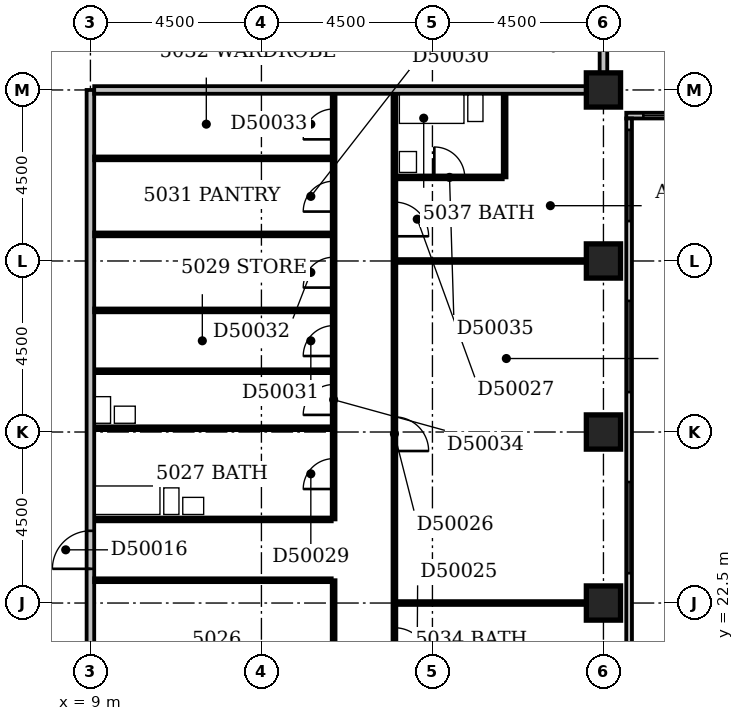
"""IFC4 building model, lengths in metres.
Left out: names, types, materials, properties, quantities, classifications, styles, units other than length and angle.
Written with IfcOpenShell. Run it as: python <this file> out.ifc"""

import sys

from ifc_helpers import new_model, si_unit, direction, frame, frame_2d, origin, origin_2d, place, context, subcontext, project, spatial, rectangle, extrude, element, fill, save


model = new_model("IFC4")
c1 = context("Model", 3, precision=1e-05, world=origin(), true_north=direction((0.0, 1.0)))
c2 = subcontext(c1, "Body", "Model", "MODEL_VIEW")
j1 = project(units=[si_unit("LENGTHUNIT", "METRE"), si_unit("PLANEANGLEUNIT", "RADIAN")], contexts=[c1])
p1 = place(None, origin())
s1 = spatial("IfcSite", under=j1, at=p1, CompositionType="ELEMENT")
p2 = place(p1, origin())
s2 = spatial("IfcBuilding", under=s1, at=p2, CompositionType="ELEMENT")
p3 = place(p2, frame((0.0, 0.0, 197.0)))
s3 = spatial("IfcBuildingStorey", under=s2, at=p3, CompositionType="ELEMENT", Elevation=197.0)
for number, where, z_axis, x_axis in (
    (1, (22.5, 22.5, -0.3), (0.0, 0.0, 1.0), (1.0, 0.0, 0.0)),
    (2, (22.5, 27.0, -0.3), (0.0, 0.0, 1.0), (1.0, 0.0, 0.0)),
    (3, (22.5, 31.5, -0.3), (0.0, 0.0, 1.0), (1.0, 0.0, 0.0)),
    (4, (22.5, 36.0, -0.3), (0.0, 0.0, 1.0), (1.0, 0.0, 0.0)),
):
    element("IfcColumn", number, at=place(p3, frame(where, z_axis=z_axis, x_axis=x_axis)), inside=s3, PredefinedType="COLUMN", context=c2, shape_type="SweptSolid", body=[
        extrude(rectangle(XDim=0.9, YDim=0.9, at=origin_2d()), origin(), (0.0, 0.0, 1.0), 3.6),
    ])
p4 = place(p3, frame((23.175, 17.4, 0.0), z_axis=(0.0, 0.0, 1.0), x_axis=(0.0, 1.0, 0.0)))
e5 = element("IfcWall", 5, at=p4, inside=s3, PredefinedType="STANDARD", context=c2, shape_type="SweptSolid", body=[
    extrude(rectangle(XDim=17.85, YDim=0.15, at=frame_2d((8.925, 0.0))), origin(), (0.0, 0.0, 1.0), 2.7),
])
p5 = place(p4, frame((1.65, 0.0, 0.6)))
e6 = element("IfcOpeningElement", 6, at=p5, cuts=e5, PredefinedType="OPENING", context=c2, shape_type="SweptSolid", body=[
    extrude(rectangle(XDim=2.4, YDim=1.8, at=frame_2d((1.2, 0.9))), frame((0.0, 0.087, 0.0), z_axis=(0.0, -1.0, 0.0), x_axis=(1.0, 0.0, 0.0)), (0.0, 0.0, 1.0), 0.174),
])
p6 = place(p4, frame((5.885, 0.0, 0.6)))
e7 = element("IfcOpeningElement", 7, at=p6, cuts=e5, PredefinedType="OPENING", context=c2, shape_type="SweptSolid", body=[
    extrude(rectangle(XDim=2.4, YDim=1.8, at=frame_2d((1.2, 0.9))), frame((0.0, 0.087, 0.0), z_axis=(0.0, -1.0, 0.0), x_axis=(1.0, 0.0, 0.0)), (0.0, 0.0, 1.0), 0.174),
])
p7 = place(p4, frame((10.65, 0.0, 0.6)))
e8 = element("IfcOpeningElement", 8, at=p7, cuts=e5, PredefinedType="OPENING", context=c2, shape_type="SweptSolid", body=[
    extrude(rectangle(XDim=2.4, YDim=1.8, at=frame_2d((1.2, 0.9))), frame((0.0, 0.087, 0.0), z_axis=(0.0, -1.0, 0.0), x_axis=(1.0, 0.0, 0.0)), (0.0, 0.0, 1.0), 0.174),
])
p8 = place(p4, frame((15.15, 0.0, 0.6)))
e9 = element("IfcOpeningElement", 9, at=p8, cuts=e5, PredefinedType="OPENING", context=c2, shape_type="SweptSolid", body=[
    extrude(rectangle(XDim=2.4, YDim=1.8, at=frame_2d((1.2, 0.9))), frame((0.0, 0.087, 0.0), z_axis=(0.0, -1.0, 0.0), x_axis=(1.0, 0.0, 0.0)), (0.0, 0.0, 1.0), 0.174),
])
p9 = place(p3, frame((23.1, 35.325, 0.0), z_axis=(0.0, 0.0, 1.0), x_axis=(1.0, 0.0, 0.0)))
e10 = element("IfcWall", 10, at=p9, inside=s3, PredefinedType="STANDARD", context=c2, shape_type="SweptSolid", body=[
    extrude(rectangle(XDim=27.15, YDim=0.15, at=frame_2d((13.575, 0.0))), origin(), (0.0, 0.0, 1.0), 2.7),
])
p10 = place(p9, frame((0.45, 0.0, 0.6)))
e11 = element("IfcOpeningElement", 11, at=p10, cuts=e10, PredefinedType="OPENING", context=c2, shape_type="SweptSolid", body=[
    extrude(rectangle(XDim=2.4, YDim=1.8, at=frame_2d((1.2, 0.9))), frame((0.0, 0.087, 0.0), z_axis=(0.0, -1.0, 0.0), x_axis=(1.0, 0.0, 0.0)), (0.0, 0.0, 1.0), 0.174),
])
p11 = place(p9, frame((4.552, 0.0, 0.6)))
e12 = element("IfcOpeningElement", 12, at=p11, cuts=e10, PredefinedType="OPENING", context=c2, shape_type="SweptSolid", body=[
    extrude(rectangle(XDim=1.5, YDim=1.8, at=frame_2d((0.75, 0.9))), frame((0.0, 0.087, 0.0), z_axis=(0.0, -1.0, 0.0), x_axis=(1.0, 0.0, 0.0)), (0.0, 0.0, 1.0), 0.174),
])
p12 = place(p9, frame((9.45, 0.0, 0.6)))
e13 = element("IfcOpeningElement", 13, at=p12, cuts=e10, PredefinedType="OPENING", context=c2, shape_type="SweptSolid", body=[
    extrude(rectangle(XDim=2.4, YDim=1.8, at=frame_2d((1.2, 0.9))), frame((0.0, 0.087, 0.0), z_axis=(0.0, -1.0, 0.0), x_axis=(1.0, 0.0, 0.0)), (0.0, 0.0, 1.0), 0.174),
])
p13 = place(p9, frame((13.95, 0.0, 0.6)))
e14 = element("IfcOpeningElement", 14, at=p13, cuts=e10, PredefinedType="OPENING", context=c2, shape_type="SweptSolid", body=[
    extrude(rectangle(XDim=2.4, YDim=1.8, at=frame_2d((1.2, 0.9))), frame((0.0, 0.087, 0.0), z_axis=(0.0, -1.0, 0.0), x_axis=(1.0, 0.0, 0.0)), (0.0, 0.0, 1.0), 0.174),
])
p14 = place(p9, frame((18.088, 0.0, 0.6)))
e15 = element("IfcOpeningElement", 15, at=p14, cuts=e10, PredefinedType="OPENING", context=c2, shape_type="SweptSolid", body=[
    extrude(rectangle(XDim=0.6, YDim=1.8, at=frame_2d((0.3, 0.9))), frame((0.0, 0.087, 0.0), z_axis=(0.0, -1.0, 0.0), x_axis=(1.0, 0.0, 0.0)), (0.0, 0.0, 1.0), 0.174),
])
p15 = place(p9, frame((20.301, 0.0, 0.6)))
e16 = element("IfcOpeningElement", 16, at=p15, cuts=e10, PredefinedType="OPENING", context=c2, shape_type="SweptSolid", body=[
    extrude(rectangle(XDim=0.9, YDim=1.8, at=frame_2d((0.45, 0.9))), frame((0.0, 0.087, 0.0), z_axis=(0.0, -1.0, 0.0), x_axis=(1.0, 0.0, 0.0)), (0.0, 0.0, 1.0), 0.174),
])
p16 = place(p9, frame((22.95, 0.0, 0.6)))
e17 = element("IfcOpeningElement", 17, at=p16, cuts=e10, PredefinedType="OPENING", context=c2, shape_type="SweptSolid", body=[
    extrude(rectangle(XDim=2.4, YDim=1.8, at=frame_2d((1.2, 0.9))), frame((0.0, 0.087, 0.0), z_axis=(0.0, -1.0, 0.0), x_axis=(1.0, 0.0, 0.0)), (0.0, 0.0, 1.0), 0.174),
])
p17 = place(p3, frame((9.0, 5.0, 0.0), z_axis=(0.0, 0.0, 1.0), x_axis=(0.0, 1.0, 0.0)))
e18 = element("IfcWall", 18, at=p17, inside=s3, PredefinedType="PARTITIONING", context=c2, shape_type="SweptSolid", body=[
    extrude(rectangle(XDim=31.0, YDim=0.2, at=frame_2d((15.5, 0.0))), origin(), (0.0, 0.0, 1.0), 3.3),
])
p18 = place(p17, frame((18.4, 0.0, 0.0)))
e19 = element("IfcOpeningElement", 19, at=p18, cuts=e18, PredefinedType="OPENING", context=c2, shape_type="SweptSolid", body=[
    extrude(rectangle(XDim=1.0, YDim=2.1, at=frame_2d((0.5, 1.05))), frame((0.0, 0.112, 0.0), z_axis=(0.0, -1.0, 0.0), x_axis=(1.0, 0.0, 0.0)), (0.0, 0.0, 1.0), 0.224),
])
p19 = place(p17, frame((11.7, 0.0, 0.0)))
e20 = element("IfcOpeningElement", 20, at=p19, cuts=e18, PredefinedType="OPENING", context=c2, shape_type="SweptSolid", body=[
    extrude(rectangle(XDim=1.0, YDim=2.1, at=frame_2d((0.5, 1.05))), frame((0.0, 0.112, 0.0), z_axis=(0.0, -1.0, 0.0), x_axis=(1.0, 0.0, 0.0)), (0.0, 0.0, 1.0), 0.224),
])
p20 = place(p17, frame((1.5, 0.0, 0.0)))
e21 = element("IfcOpeningElement", 21, at=p20, cuts=e18, PredefinedType="OPENING", context=c2, shape_type="SweptSolid", body=[
    extrude(rectangle(XDim=0.9, YDim=2.1, at=frame_2d((0.45, 1.05))), frame((0.0, 0.112, 0.0), z_axis=(0.0, -1.0, 0.0), x_axis=(1.0, 0.0, 0.0)), (0.0, 0.0, 1.0), 0.224),
])
p21 = place(p3, frame((15.4, 18.1, 0.0), z_axis=(0.0, 0.0, 1.0), x_axis=(0.0, 1.0, 0.0)))
e22 = element("IfcWall", 22, at=p21, inside=s3, PredefinedType="PARTITIONING", context=c2, shape_type="SweptSolid", body=[
    extrude(rectangle(XDim=5.0, YDim=0.1, at=frame_2d((2.5, 0.0))), origin(), (0.0, 0.0, 1.0), 3.3),
])
p22 = place(p21, frame((2.0, 0.0, 0.0)))
e23 = element("IfcOpeningElement", 23, at=p22, cuts=e22, PredefinedType="OPENING", context=c2, shape_type="SweptSolid", body=[
    extrude(rectangle(XDim=0.9, YDim=2.1, at=frame_2d((0.45, 1.05))), frame((0.0, 0.062, 0.0), z_axis=(0.0, -1.0, 0.0), x_axis=(1.0, 0.0, 0.0)), (0.0, 0.0, 1.0), 0.124),
])
p23 = place(p3, frame((17.0, 18.1, 0.0), z_axis=(0.0, 0.0, 1.0), x_axis=(0.0, 1.0, 0.0)))
e24 = element("IfcWall", 24, at=p23, inside=s3, PredefinedType="PARTITIONING", context=c2, shape_type="SweptSolid", body=[
    extrude(rectangle(XDim=17.8, YDim=0.1, at=frame_2d((8.9, 0.0))), origin(), (0.0, 0.0, 1.0), 3.3),
])
p24 = place(p23, frame((2.85, 0.0, 0.0)))
e25 = element("IfcOpeningElement", 25, at=p24, cuts=e24, PredefinedType="OPENING", context=c2, shape_type="SweptSolid", body=[
    extrude(rectangle(XDim=0.9, YDim=2.1, at=frame_2d((0.45, 1.05))), frame((0.0, 0.062, 0.0), z_axis=(0.0, -1.0, 0.0), x_axis=(1.0, 0.0, 0.0)), (0.0, 0.0, 1.0), 0.124),
])
p25 = place(p23, frame((8.4, 0.0, 0.0)))
e26 = element("IfcOpeningElement", 26, at=p25, cuts=e24, PredefinedType="OPENING", context=c2, shape_type="SweptSolid", body=[
    extrude(rectangle(XDim=0.9, YDim=2.1, at=frame_2d((0.45, 1.05))), frame((0.0, 0.062, 0.0), z_axis=(0.0, -1.0, 0.0), x_axis=(1.0, 0.0, 0.0)), (0.0, 0.0, 1.0), 0.124),
])
p26 = place(p23, frame((14.05, 0.0, 0.0)))
e27 = element("IfcOpeningElement", 27, at=p26, cuts=e24, PredefinedType="OPENING", context=c2, shape_type="SweptSolid", body=[
    extrude(rectangle(XDim=0.9, YDim=2.1, at=frame_2d((0.45, 1.05))), frame((0.0, 0.062, 0.0), z_axis=(0.0, -1.0, 0.0), x_axis=(1.0, 0.0, 0.0)), (0.0, 0.0, 1.0), 0.124),
])
p27 = place(p3, frame((17.05, 22.5, 0.0), z_axis=(0.0, 0.0, 1.0), x_axis=(1.0, 0.0, 0.0)))
e28 = element("IfcWall", 28, at=p27, inside=s3, PredefinedType="PARTITIONING", context=c2, shape_type="SweptSolid", body=[
    extrude(rectangle(XDim=5.0, YDim=0.1, at=frame_2d((2.5, 0.0))), origin(), (0.0, 0.0, 1.0), 3.3),
])
p28 = place(p3, frame((9.1, 23.1, 0.0), z_axis=(0.0, 0.0, 1.0), x_axis=(1.0, 0.0, 0.0)))
e29 = element("IfcWall", 29, at=p28, inside=s3, PredefinedType="PARTITIONING", context=c2, shape_type="SweptSolid", body=[
    extrude(rectangle(XDim=6.25, YDim=0.1, at=frame_2d((3.125, 0.0))), origin(), (0.0, 0.0, 1.0), 3.3),
])
p29 = place(p3, frame((9.1, 24.7, 0.0), z_axis=(0.0, 0.0, 1.0), x_axis=(1.0, 0.0, 0.0)))
e30 = element("IfcWall", 30, at=p29, inside=s3, PredefinedType="PLUMBINGWALL", context=c2, shape_type="SweptSolid", body=[
    extrude(rectangle(XDim=6.25, YDim=0.1, at=frame_2d((3.125, 0.0))), origin(), (0.0, 0.0, 1.0), 3.3),
])
p30 = place(p3, frame((15.4, 24.7, 0.0), z_axis=(0.0, 0.0, 1.0), x_axis=(0.0, 1.0, 0.0)))
e31 = element("IfcWall", 31, at=p30, inside=s3, PredefinedType="PARTITIONING", context=c2, shape_type="SweptSolid", body=[
    extrude(rectangle(XDim=11.2, YDim=0.1, at=frame_2d((5.6, 0.0))), origin(), (0.0, 0.0, 1.0), 3.3),
])
p31 = place(p30, frame((0.8, 0.0, 0.0)))
e32 = element("IfcOpeningElement", 32, at=p31, cuts=e31, PredefinedType="OPENING", context=c2, shape_type="SweptSolid", body=[
    extrude(rectangle(XDim=0.8, YDim=2.1, at=frame_2d((0.4, 1.05))), frame((0.0, 0.062, 0.0), z_axis=(0.0, -1.0, 0.0), x_axis=(1.0, 0.0, 0.0)), (0.0, 0.0, 1.0), 0.124),
])
p32 = place(p30, frame((8.1, 0.0, 0.0)))
e33 = element("IfcOpeningElement", 33, at=p32, cuts=e31, PredefinedType="OPENING", context=c2, shape_type="SweptSolid", body=[
    extrude(rectangle(XDim=0.8, YDim=2.1, at=frame_2d((0.4, 1.05))), frame((0.0, 0.062, 0.0), z_axis=(0.0, -1.0, 0.0), x_axis=(1.0, 0.0, 0.0)), (0.0, 0.0, 1.0), 0.124),
])
p33 = place(p30, frame((4.3, 0.0, 0.0)))
e34 = element("IfcOpeningElement", 34, at=p33, cuts=e31, PredefinedType="OPENING", context=c2, shape_type="SweptSolid", body=[
    extrude(rectangle(XDim=0.8, YDim=2.1, at=frame_2d((0.4, 1.05))), frame((0.0, 0.062, 0.0), z_axis=(0.0, -1.0, 0.0), x_axis=(1.0, 0.0, 0.0)), (0.0, 0.0, 1.0), 0.124),
])
p34 = place(p30, frame((6.1, 0.0, 0.0)))
e35 = element("IfcOpeningElement", 35, at=p34, cuts=e31, PredefinedType="OPENING", context=c2, shape_type="SweptSolid", body=[
    extrude(rectangle(XDim=0.8, YDim=2.1, at=frame_2d((0.4, 1.05))), frame((0.0, 0.062, 0.0), z_axis=(0.0, -1.0, 0.0), x_axis=(1.0, 0.0, 0.0)), (0.0, 0.0, 1.0), 0.124),
])
p35 = place(p30, frame((10.0, 0.0, 0.0)))
e36 = element("IfcOpeningElement", 36, at=p35, cuts=e31, PredefinedType="OPENING", context=c2, shape_type="SweptSolid", body=[
    extrude(rectangle(XDim=0.8, YDim=2.1, at=frame_2d((0.4, 1.05))), frame((0.0, 0.062, 0.0), z_axis=(0.0, -1.0, 0.0), x_axis=(1.0, 0.0, 0.0)), (0.0, 0.0, 1.0), 0.124),
])
p36 = place(p30, frame((2.75, 0.0, 0.0)))
e37 = element("IfcOpeningElement", 37, at=p36, cuts=e31, PredefinedType="OPENING", context=c2, shape_type="SweptSolid", body=[
    extrude(rectangle(XDim=0.8, YDim=2.1, at=frame_2d((0.4, 1.05))), frame((0.0, 0.062, 0.0), z_axis=(0.0, -1.0, 0.0), x_axis=(1.0, 0.0, 0.0)), (0.0, 0.0, 1.0), 0.124),
])
p37 = place(p3, frame((9.1, 27.1, 0.0), z_axis=(0.0, 0.0, 1.0), x_axis=(1.0, 0.0, 0.0)))
e38 = element("IfcWall", 38, at=p37, inside=s3, PredefinedType="PLUMBINGWALL", context=c2, shape_type="SweptSolid", body=[
    extrude(rectangle(XDim=6.25, YDim=0.1, at=frame_2d((3.125, 0.0))), origin(), (0.0, 0.0, 1.0), 2.7),
])
p38 = place(p3, frame((9.1, 28.6, 0.0), z_axis=(0.0, 0.0, 1.0), x_axis=(1.0, 0.0, 0.0)))
e39 = element("IfcWall", 39, at=p38, inside=s3, PredefinedType="PLUMBINGWALL", context=c2, shape_type="SweptSolid", body=[
    extrude(rectangle(XDim=6.25, YDim=0.1, at=frame_2d((3.125, 0.0))), origin(), (0.0, 0.0, 1.0), 3.3),
])
p39 = place(p3, frame((9.1, 30.2, 0.0), z_axis=(0.0, 0.0, 1.0), x_axis=(1.0, 0.0, 0.0)))
e40 = element("IfcWall", 40, at=p39, inside=s3, PredefinedType="PARTITIONING", context=c2, shape_type="SweptSolid", body=[
    extrude(rectangle(XDim=6.25, YDim=0.1, at=frame_2d((3.125, 0.0))), origin(), (0.0, 0.0, 1.0), 3.3),
])
p40 = place(p3, frame((17.05, 31.5, 0.0), z_axis=(0.0, 0.0, 1.0), x_axis=(1.0, 0.0, 0.0)))
e41 = element("IfcWall", 41, at=p40, inside=s3, PredefinedType="PARTITIONING", context=c2, shape_type="SweptSolid", body=[
    extrude(rectangle(XDim=5.0, YDim=0.1, at=frame_2d((2.5, 0.0))), origin(), (0.0, 0.0, 1.0), 3.3),
])
p41 = place(p3, frame((9.1, 32.2, 0.0), z_axis=(0.0, 0.0, 1.0), x_axis=(1.0, 0.0, 0.0)))
e42 = element("IfcWall", 42, at=p41, inside=s3, PredefinedType="PARTITIONING", context=c2, shape_type="SweptSolid", body=[
    extrude(rectangle(XDim=6.25, YDim=0.1, at=frame_2d((3.125, 0.0))), origin(), (0.0, 0.0, 1.0), 3.3),
])
p42 = place(p3, frame((17.05, 33.7, 0.0), z_axis=(0.0, 0.0, 1.0), x_axis=(1.0, 0.0, 0.0)))
e43 = element("IfcWall", 43, at=p42, inside=s3, PredefinedType="PLUMBINGWALL", context=c2, shape_type="SweptSolid", body=[
    extrude(rectangle(XDim=2.8, YDim=0.1, at=frame_2d((1.4, 0.0))), origin(), (0.0, 0.0, 1.0), 3.3),
])
p43 = place(p42, frame((1.0, 0.0, 0.0)))
e44 = element("IfcOpeningElement", 44, at=p43, cuts=e43, PredefinedType="OPENING", context=c2, shape_type="SweptSolid", body=[
    extrude(rectangle(XDim=0.8, YDim=2.1, at=frame_2d((0.4, 1.05))), frame((0.0, 0.062, 0.0), z_axis=(0.0, -1.0, 0.0), x_axis=(1.0, 0.0, 0.0)), (0.0, 0.0, 1.0), 0.124),
])
p44 = place(p3, frame((19.9, 33.7, 0.0), z_axis=(0.0, 0.0, 1.0), x_axis=(0.0, 1.0, 0.0)))
e45 = element("IfcWall", 45, at=p44, inside=s3, PredefinedType="PLUMBINGWALL", context=c2, shape_type="SweptSolid", body=[
    extrude(rectangle(XDim=2.2, YDim=0.1, at=frame_2d((1.1, 0.0))), origin(), (0.0, 0.0, 1.0), 3.3),
])
p45 = place(p3, frame((9.1, 34.2, 0.0), z_axis=(0.0, 0.0, 1.0), x_axis=(1.0, 0.0, 0.0)))
e46 = element("IfcWall", 46, at=p45, inside=s3, PredefinedType="PARTITIONING", context=c2, shape_type="SweptSolid", body=[
    extrude(rectangle(XDim=6.25, YDim=0.1, at=frame_2d((3.125, 0.0))), origin(), (0.0, 0.0, 1.0), 3.3),
])
p46 = place(p3, frame((9.1, 36.0, 0.0), z_axis=(0.0, 0.0, 1.0), x_axis=(1.0, 0.0, 0.0)))
e47 = element("IfcWall", 47, at=p46, inside=s3, PredefinedType="PARTITIONING", context=c2, shape_type="SweptSolid", body=[
    extrude(rectangle(XDim=12.95, YDim=0.2, at=frame_2d((6.475, 0.0))), origin(), (0.0, 0.0, 1.0), 3.3),
])
p47 = place(p3, frame((22.5, 36.45, 0.0), z_axis=(0.0, 0.0, 1.0), x_axis=(0.0, 1.0, 0.0)))
e48 = element("IfcWall", 48, at=p47, inside=s3, PredefinedType="PARTITIONING", context=c2, shape_type="SweptSolid", body=[
    extrude(rectangle(XDim=13.05, YDim=0.2, at=frame_2d((6.525, 0.0))), origin(), (0.0, 0.0, 1.0), 3.3),
])
p48 = place(p6, origin())
e49 = element("IfcWindow", 49, at=p48, inside=s3, PartitioningType="SINGLE_PANEL", PredefinedType="WINDOW", context=c2, shape_type="SweptSolid", body=[
    extrude(rectangle(XDim=2.4, YDim=1.8, at=frame_2d((1.2, 0.9))), frame((0.0, 0.03, 0.0), z_axis=(0.0, -1.0, 0.0), x_axis=(1.0, 0.0, 0.0)), (0.0, 0.0, 1.0), 0.06),
])
fill(e7, e49)
p49 = place(p7, origin())
e50 = element("IfcWindow", 50, at=p49, inside=s3, PartitioningType="SINGLE_PANEL", PredefinedType="WINDOW", context=c2, shape_type="SweptSolid", body=[
    extrude(rectangle(XDim=2.4, YDim=1.8, at=frame_2d((1.2, 0.9))), frame((0.0, 0.03, 0.0), z_axis=(0.0, -1.0, 0.0), x_axis=(1.0, 0.0, 0.0)), (0.0, 0.0, 1.0), 0.06),
])
fill(e8, e50)
p50 = place(p8, origin())
e51 = element("IfcWindow", 51, at=p50, inside=s3, PartitioningType="SINGLE_PANEL", PredefinedType="WINDOW", context=c2, shape_type="SweptSolid", body=[
    extrude(rectangle(XDim=2.4, YDim=1.8, at=frame_2d((1.2, 0.9))), frame((0.0, 0.03, 0.0), z_axis=(0.0, -1.0, 0.0), x_axis=(1.0, 0.0, 0.0)), (0.0, 0.0, 1.0), 0.06),
])
fill(e9, e51)
p51 = place(p10, origin())
e52 = element("IfcWindow", 52, at=p51, inside=s3, PartitioningType="SINGLE_PANEL", PredefinedType="WINDOW", context=c2, shape_type="SweptSolid", body=[
    extrude(rectangle(XDim=2.4, YDim=1.8, at=frame_2d((1.2, 0.9))), frame((0.0, 0.03, 0.0), z_axis=(0.0, -1.0, 0.0), x_axis=(1.0, 0.0, 0.0)), (0.0, 0.0, 1.0), 0.06),
])
fill(e11, e52)
p52 = place(p18, origin())
e53 = element("IfcDoor", 53, at=p52, inside=s3, OperationType="SINGLE_SWING_LEFT", PredefinedType="DOOR", context=c2, shape_type="SweptSolid", body=[
    extrude(rectangle(XDim=1.0, YDim=2.1, at=frame_2d((0.5, 1.05))), frame((0.0, 0.025, 0.0), z_axis=(0.0, -1.0, 0.0), x_axis=(1.0, 0.0, 0.0)), (0.0, 0.0, 1.0), 0.05),
])
fill(e19, e53)
p53 = place(p24, frame((0.9, 0.0, 0.0), z_axis=(0.0, 0.0, 1.0), x_axis=(-1.0, 0.0, 0.0)))
e54 = element("IfcDoor", 54, at=p53, inside=s3, OperationType="SINGLE_SWING_RIGHT", PredefinedType="DOOR", context=c2, shape_type="SweptSolid", body=[
    extrude(rectangle(XDim=0.9, YDim=2.1, at=frame_2d((0.45, 1.05))), frame((0.0, 0.025, 0.0), z_axis=(0.0, -1.0, 0.0), x_axis=(1.0, 0.0, 0.0)), (0.0, 0.0, 1.0), 0.05),
])
fill(e25, e54)
p54 = place(p25, frame((0.9, 0.0, 0.0), z_axis=(0.0, 0.0, 1.0), x_axis=(-1.0, 0.0, 0.0)))
e55 = element("IfcDoor", 55, at=p54, inside=s3, OperationType="SINGLE_SWING_RIGHT", PredefinedType="DOOR", context=c2, shape_type="SweptSolid", body=[
    extrude(rectangle(XDim=0.9, YDim=2.1, at=frame_2d((0.45, 1.05))), frame((0.0, 0.025, 0.0), z_axis=(0.0, -1.0, 0.0), x_axis=(1.0, 0.0, 0.0)), (0.0, 0.0, 1.0), 0.05),
])
fill(e26, e55)
p55 = place(p26, frame((0.9, 0.0, 0.0), z_axis=(0.0, 0.0, 1.0), x_axis=(-1.0, 0.0, 0.0)))
e56 = element("IfcDoor", 56, at=p55, inside=s3, OperationType="SINGLE_SWING_RIGHT", PredefinedType="DOOR", context=c2, shape_type="SweptSolid", body=[
    extrude(rectangle(XDim=0.9, YDim=2.1, at=frame_2d((0.45, 1.05))), frame((0.0, 0.025, 0.0), z_axis=(0.0, -1.0, 0.0), x_axis=(1.0, 0.0, 0.0)), (0.0, 0.0, 1.0), 0.05),
])
fill(e27, e56)
p56 = place(p31, origin())
e57 = element("IfcDoor", 57, at=p56, inside=s3, OperationType="SINGLE_SWING_LEFT", PredefinedType="DOOR", context=c2, shape_type="SweptSolid", body=[
    extrude(rectangle(XDim=0.8, YDim=2.1, at=frame_2d((0.4, 1.05))), frame((0.0, 0.025, 0.0), z_axis=(0.0, -1.0, 0.0), x_axis=(1.0, 0.0, 0.0)), (0.0, 0.0, 1.0), 0.05),
])
fill(e32, e57)
p57 = place(p32, origin())
e58 = element("IfcDoor", 58, at=p57, inside=s3, OperationType="SINGLE_SWING_LEFT", PredefinedType="DOOR", context=c2, shape_type="SweptSolid", body=[
    extrude(rectangle(XDim=0.8, YDim=2.1, at=frame_2d((0.4, 1.05))), frame((0.0, 0.025, 0.0), z_axis=(0.0, -1.0, 0.0), x_axis=(1.0, 0.0, 0.0)), (0.0, 0.0, 1.0), 0.05),
])
fill(e33, e58)
p58 = place(p33, origin())
e59 = element("IfcDoor", 59, at=p58, inside=s3, OperationType="SINGLE_SWING_LEFT", PredefinedType="DOOR", context=c2, shape_type="SweptSolid", body=[
    extrude(rectangle(XDim=0.8, YDim=2.1, at=frame_2d((0.4, 1.05))), frame((0.0, 0.025, 0.0), z_axis=(0.0, -1.0, 0.0), x_axis=(1.0, 0.0, 0.0)), (0.0, 0.0, 1.0), 0.05),
])
fill(e34, e59)
p59 = place(p34, origin())
e60 = element("IfcDoor", 60, at=p59, inside=s3, OperationType="SINGLE_SWING_LEFT", PredefinedType="DOOR", context=c2, shape_type="SweptSolid", body=[
    extrude(rectangle(XDim=0.8, YDim=2.1, at=frame_2d((0.4, 1.05))), frame((0.0, 0.025, 0.0), z_axis=(0.0, -1.0, 0.0), x_axis=(1.0, 0.0, 0.0)), (0.0, 0.0, 1.0), 0.05),
])
fill(e35, e60)
p60 = place(p35, origin())
e61 = element("IfcDoor", 61, at=p60, inside=s3, OperationType="SINGLE_SWING_LEFT", PredefinedType="DOOR", context=c2, shape_type="SweptSolid", body=[
    extrude(rectangle(XDim=0.8, YDim=2.1, at=frame_2d((0.4, 1.05))), frame((0.0, 0.025, 0.0), z_axis=(0.0, -1.0, 0.0), x_axis=(1.0, 0.0, 0.0)), (0.0, 0.0, 1.0), 0.05),
])
fill(e36, e61)
p61 = place(p36, origin())
e62 = element("IfcDoor", 62, at=p61, inside=s3, OperationType="SINGLE_SWING_LEFT", PredefinedType="DOOR", context=c2, shape_type="SweptSolid", body=[
    extrude(rectangle(XDim=0.8, YDim=2.1, at=frame_2d((0.4, 1.05))), frame((0.0, 0.025, 0.0), z_axis=(0.0, -1.0, 0.0), x_axis=(1.0, 0.0, 0.0)), (0.0, 0.0, 1.0), 0.05),
])
fill(e37, e62)
p62 = place(p43, origin())
e63 = element("IfcDoor", 63, at=p62, inside=s3, OperationType="SINGLE_SWING_LEFT", PredefinedType="DOOR", context=c2, shape_type="SweptSolid", body=[
    extrude(rectangle(XDim=0.8, YDim=2.1, at=frame_2d((0.4, 1.05))), frame((0.0, 0.025, 0.0), z_axis=(0.0, -1.0, 0.0), x_axis=(1.0, 0.0, 0.0)), (0.0, 0.0, 1.0), 0.05),
])
fill(e44, e63)
save(model, sys.argv[1])
